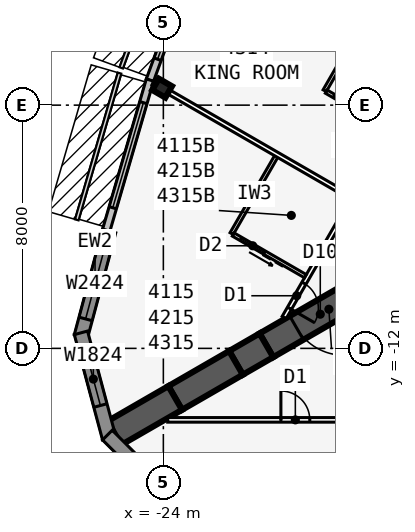
"""IFC4 building model, lengths in metres.
Left out: names, types, materials, properties, quantities, classifications, styles, units other than length and angle.
Written with IfcOpenShell. Run it as: python <this file> out.ifc"""

import sys

from ifc_helpers import new_model, si_unit, direction, frame, frame_2d, origin, origin_2d, place, context, subcontext, project, spatial, polyline, rectangle, i_section, outline, extrude, element, fill, save


model = new_model("IFC4")
c1 = context("Model", 3, precision=1e-05, world=origin(), true_north=direction((0.0, 1.0)))
c2 = subcontext(c1, "Body", "Model", "MODEL_VIEW")
j1 = project(units=[si_unit("LENGTHUNIT", "METRE"), si_unit("PLANEANGLEUNIT", "RADIAN")], contexts=[c1])
p1 = place(None, origin())
s1 = spatial("IfcSite", under=j1, at=p1, CompositionType="ELEMENT")
p2 = place(p1, origin())
s2 = spatial("IfcBuilding", under=s1, at=p2, CompositionType="ELEMENT")
p3 = place(p2, frame((0.0, 0.0, 155.5)))
s3 = spatial("IfcBuildingStorey", under=s2, at=p3, CompositionType="ELEMENT", Elevation=155.5)
p4 = place(p3, frame((-16.5, -9.526, 0.0), z_axis=(0.0, 0.0, 1.0), x_axis=(-0.866031398331, -0.499989616998, 0.0)))
e1 = element("IfcWall", 1, at=p4, inside=s3, PredefinedType="SHEAR", context=c2, shape_type="SweptSolid", body=[
    extrude(rectangle(XDim=4.746, YDim=0.9, at=frame_2d((2.373, 0.0))), origin(), (0.0, 0.0, 1.0), 3.4),
])
p5 = place(p4, frame((1.8, 0.0, 0.0)))
e2 = element("IfcOpeningElement", 2, at=p5, cuts=e1, PredefinedType="OPENING", context=c2, shape_type="SweptSolid", body=[
    extrude(rectangle(XDim=1.8, YDim=2.13, at=frame_2d((0.9, 1.065))), frame((0.0, 0.46, 0.0), z_axis=(0.0, -1.0, 0.0), x_axis=(1.0, 0.0, 0.0)), (0.0, 0.0, 1.0), 0.92),
])
p6 = place(p3, frame((-20.61, -11.899, 0.0), z_axis=(0.0, 0.0, 1.0), x_axis=(-0.866009537788, -0.500027479704, 0.0)))
e3 = element("IfcWall", 3, at=p6, inside=s3, PredefinedType="SHEAR", context=c2, shape_type="SweptSolid", body=[
    extrude(rectangle(XDim=1.155, YDim=0.9, at=frame_2d((0.577, 0.0))), origin(), (0.0, 0.0, 1.0), 3.4),
])
for number, where, z_axis, x_axis in (
    (4, (-21.61, -12.477, 0.0), (0.0, 0.0, 1.0), (-0.866, -0.5, 0.0)),
    (5, (-23.61, -13.631, 0.0), (0.0, 0.0, 1.0), (-0.866, -0.5, 0.0)),
):
    element("IfcWall", number, at=place(p3, frame(where, z_axis=z_axis, x_axis=x_axis)), inside=s3, PredefinedType="SHEAR", context=c2, shape_type="SweptSolid", body=[
        extrude(rectangle(XDim=2.309, YDim=0.9, at=frame_2d((1.155, 0.0))), origin(), (0.0, 0.0, 1.0), 3.4),
    ])
p7 = place(p3, frame((-24.041, -3.44, 0.0), z_axis=(0.0, 0.0, 1.0), x_axis=(-0.5, -0.866025403784, 0.0)))
e6 = element("IfcColumn", 6, at=p7, inside=s3, PredefinedType="COLUMN", context=c2, shape_type="SweptSolid", body=[
    extrude(i_section(OverallWidth=0.432, OverallDepth=0.498, WebThickness=0.056, FlangeThickness=0.089, at=origin_2d()), origin(), (0.0, 0.0, 1.0), 3.4),
])
p8 = place(p3, frame((-22.701, 1.584, 0.0), z_axis=(0.0, 0.0, 1.0), x_axis=(-0.343225593282, -0.939252996863, 0.0)))
e7 = element("IfcWall", 7, at=p8, inside=s3, PredefinedType="STANDARD", context=c2, shape_type="SweptSolid", body=[
    extrude(rectangle(XDim=5.076, YDim=0.25, at=frame_2d((2.538, 0.0))), origin(), (0.0, 0.0, 1.0), 3.235),
])
p9 = place(p8, frame((0.738, 0.0, 0.45)))
e8 = element("IfcOpeningElement", 8, at=p9, cuts=e7, PredefinedType="OPENING", context=c2, shape_type="SweptSolid", body=[
    extrude(rectangle(XDim=3.6, YDim=2.4, at=frame_2d((1.8, 1.2))), frame((0.0, 0.135, 0.0), z_axis=(0.0, -1.0, 0.0), x_axis=(1.0, 0.0, 0.0)), (0.0, 0.0, 1.0), 0.27),
])
p10 = place(p3, frame((-24.441, -3.175, 0.0), z_axis=(0.0, 0.0, 1.0), x_axis=(-0.279528287117, -0.960137457191, 0.0)))
e9 = element("IfcWall", 9, at=p10, inside=s3, PredefinedType="STANDARD", context=c2, shape_type="SweptSolid", body=[
    extrude(rectangle(XDim=5.148, YDim=0.25, at=frame_2d((2.574, 0.0))), origin(), (0.0, 0.0, 1.0), 3.235),
])
p11 = place(p10, frame((0.774, 0.0, 0.45)))
e10 = element("IfcOpeningElement", 10, at=p11, cuts=e9, PredefinedType="OPENING", context=c2, shape_type="SweptSolid", body=[
    extrude(rectangle(XDim=3.6, YDim=2.4, at=frame_2d((1.8, 1.2))), frame((0.0, 0.135, 0.0), z_axis=(0.0, -1.0, 0.0), x_axis=(1.0, 0.0, 0.0)), (0.0, 0.0, 1.0), 0.27),
])
p12 = place(p3, frame((-25.783, -8.141, 0.0), z_axis=(0.0, 0.0, 1.0), x_axis=(-0.258823421857, -0.965924653531, 0.0)))
e11 = element("IfcWall", 11, at=p12, inside=s3, PredefinedType="SOLIDWALL", context=c2, shape_type="SweptSolid", body=[
    extrude(rectangle(XDim=3.586, YDim=0.45, at=frame_2d((1.793, 0.0))), origin(), (0.0, 0.0, 1.0), 3.235),
])
p13 = place(p12, frame((0.593, 0.0, 0.45)))
e12 = element("IfcOpeningElement", 12, at=p13, cuts=e11, PredefinedType="OPENING", context=c2, shape_type="SweptSolid", body=[
    extrude(rectangle(XDim=2.4, YDim=2.4, at=frame_2d((1.2, 1.2))), frame((0.0, 0.235, 0.0), z_axis=(0.0, -1.0, 0.0), x_axis=(1.0, 0.0, 0.0)), (0.0, 0.0, 1.0), 0.47),
])
p14 = place(p3, frame((-26.711, -11.489, 0.0), z_axis=(0.0, 0.0, 1.0), x_axis=(0.258823421857, -0.965924653531, 0.0)))
e13 = element("IfcWall", 13, at=p14, inside=s3, PredefinedType="SOLIDWALL", context=c2, shape_type="SweptSolid", body=[
    extrude(outline(polyline([(3.586, 0.225), (3.527, 0.225), (3.035, 0.093), (3.0, 0.225), (0.0, 0.225), (0.0, -0.225), (3.586, -0.225), (3.586, 0.225)])), origin(), (0.0, 0.0, 1.0), 3.235),
])
p15 = place(p14, frame((0.675, 0.0, 0.45)))
e14 = element("IfcOpeningElement", 14, at=p15, cuts=e13, PredefinedType="OPENING", context=c2, shape_type="SweptSolid", body=[
    extrude(rectangle(XDim=1.8, YDim=2.4, at=frame_2d((0.9, 1.2))), frame((0.0, 0.235, 0.0), z_axis=(0.0, -1.0, 0.0), x_axis=(1.0, 0.0, 0.0)), (0.0, 0.0, 1.0), 0.47),
])
p16 = place(p3, frame((-25.841, -14.852, 0.0), z_axis=(0.0, 0.0, 1.0), x_axis=(0.707106781187, -0.707106781187, 0.0)))
e15 = element("IfcWall", 15, at=p16, inside=s3, PredefinedType="SOLIDWALL", context=c2, shape_type="SweptSolid", body=[
    extrude(outline(polyline([(3.586, 0.225), (0.586, 0.225), (0.551, 0.093), (0.059, 0.225), (0.0, 0.225), (0.0, -0.225), (3.586, -0.225), (3.586, 0.225)])), origin(), (0.0, 0.0, 1.0), 3.235),
])
p17 = place(p16, frame((1.111, 0.0, 0.45)))
e16 = element("IfcOpeningElement", 16, at=p17, cuts=e15, PredefinedType="OPENING", context=c2, shape_type="SweptSolid", body=[
    extrude(rectangle(XDim=1.8, YDim=2.4, at=frame_2d((0.9, 1.2))), frame((0.0, 0.235, 0.0), z_axis=(0.0, -1.0, 0.0), x_axis=(1.0, 0.0, 0.0)), (0.0, 0.0, 1.0), 0.47),
])
p18 = place(p3, frame((-23.857, -14.351, 0.0), z_axis=(0.0, 0.0, 1.0), x_axis=(1.0, 0.0, 0.0)))
e17 = element("IfcWall", 17, at=p18, inside=s3, PredefinedType="PARTITIONING", context=c2, shape_type="SweptSolid", body=[
    extrude(rectangle(XDim=47.714, YDim=0.15, at=frame_2d((23.857, 0.0))), origin(), (0.0, 0.0, 1.0), 3.235),
])
p19 = place(p18, frame((3.723, 0.0, 0.0)))
e18 = element("IfcOpeningElement", 18, at=p19, cuts=e17, PredefinedType="OPENING", context=c2, shape_type="SweptSolid", body=[
    extrude(rectangle(XDim=0.95, YDim=2.13, at=frame_2d((0.475, 1.065))), frame((0.0, 0.085, 0.0), z_axis=(0.0, -1.0, 0.0), x_axis=(1.0, 0.0, 0.0)), (0.0, 0.0, 1.0), 0.17),
])
p20 = place(p18, frame((17.082, 0.0, 0.0)))
e19 = element("IfcOpeningElement", 19, at=p20, cuts=e17, PredefinedType="OPENING", context=c2, shape_type="SweptSolid", body=[
    extrude(rectangle(XDim=0.95, YDim=2.13, at=frame_2d((0.475, 1.065))), frame((0.0, 0.085, 0.0), z_axis=(0.0, -1.0, 0.0), x_axis=(1.0, 0.0, 0.0)), (0.0, 0.0, 1.0), 0.17),
])
p21 = place(p18, frame((25.857, 0.0, 0.0)))
e20 = element("IfcOpeningElement", 20, at=p21, cuts=e17, PredefinedType="OPENING", context=c2, shape_type="SweptSolid", body=[
    extrude(rectangle(XDim=1.0, YDim=2.13, at=frame_2d((0.5, 1.065))), frame((0.0, 0.085, 0.0), z_axis=(0.0, -1.0, 0.0), x_axis=(1.0, 0.0, 0.0)), (0.0, 0.0, 1.0), 0.17),
])
p22 = place(p18, frame((30.282, 0.0, 0.0)))
e21 = element("IfcOpeningElement", 21, at=p22, cuts=e17, PredefinedType="OPENING", context=c2, shape_type="SweptSolid", body=[
    extrude(rectangle(XDim=0.95, YDim=2.13, at=frame_2d((0.475, 1.065))), frame((0.0, 0.085, 0.0), z_axis=(0.0, -1.0, 0.0), x_axis=(1.0, 0.0, 0.0)), (0.0, 0.0, 1.0), 0.17),
])
p23 = place(p18, frame((43.041, 0.0, 0.0)))
e22 = element("IfcOpeningElement", 22, at=p23, cuts=e17, PredefinedType="OPENING", context=c2, shape_type="SweptSolid", body=[
    extrude(rectangle(XDim=0.95, YDim=2.13, at=frame_2d((0.475, 1.065))), frame((0.0, 0.085, 0.0), z_axis=(0.0, -1.0, 0.0), x_axis=(1.0, 0.0, 0.0)), (0.0, 0.0, 1.0), 0.17),
])
p24 = place(p3, frame((-0.5, 22.836, 0.0), z_axis=(0.0, 0.0, 1.0), x_axis=(-0.500001677587, -0.866024435227, 0.0)))
e23 = element("IfcWall", 23, at=p24, inside=s3, PredefinedType="PARTITIONING", context=c2, shape_type="SweptSolid", body=[
    extrude(rectangle(XDim=39.054, YDim=0.15, at=frame_2d((19.527, 0.0))), origin(), (0.0, 0.0, 1.0), 3.235),
])
p25 = place(p24, frame((0.352, 0.0, 0.0)))
e24 = element("IfcOpeningElement", 24, at=p25, cuts=e23, PredefinedType="OPENING", context=c2, shape_type="SweptSolid", body=[
    extrude(rectangle(XDim=0.95, YDim=2.13, at=frame_2d((0.475, 1.065))), frame((0.0, 0.085, 0.0), z_axis=(0.0, -1.0, 0.0), x_axis=(1.0, 0.0, 0.0)), (0.0, 0.0, 1.0), 0.17),
])
p26 = place(p24, frame((5.952, 0.0, 0.0)))
e25 = element("IfcOpeningElement", 25, at=p26, cuts=e23, PredefinedType="OPENING", context=c2, shape_type="SweptSolid", body=[
    extrude(rectangle(XDim=0.95, YDim=2.13, at=frame_2d((0.475, 1.065))), frame((0.0, 0.085, 0.0), z_axis=(0.0, -1.0, 0.0), x_axis=(1.0, 0.0, 0.0)), (0.0, 0.0, 1.0), 0.17),
])
p27 = place(p24, frame((12.752, 0.0, 0.0)))
e26 = element("IfcOpeningElement", 26, at=p27, cuts=e23, PredefinedType="OPENING", context=c2, shape_type="SweptSolid", body=[
    extrude(rectangle(XDim=0.95, YDim=2.13, at=frame_2d((0.475, 1.065))), frame((0.0, 0.085, 0.0), z_axis=(0.0, -1.0, 0.0), x_axis=(1.0, 0.0, 0.0)), (0.0, 0.0, 1.0), 0.17),
])
p28 = place(p24, frame((25.352, 0.0, 0.0)))
e27 = element("IfcOpeningElement", 27, at=p28, cuts=e23, PredefinedType="OPENING", context=c2, shape_type="SweptSolid", body=[
    extrude(rectangle(XDim=0.95, YDim=2.13, at=frame_2d((0.475, 1.065))), frame((0.0, 0.085, 0.0), z_axis=(0.0, -1.0, 0.0), x_axis=(1.0, 0.0, 0.0)), (0.0, 0.0, 1.0), 0.17),
])
p29 = place(p24, frame((32.152, 0.0, 0.0)))
e28 = element("IfcOpeningElement", 28, at=p29, cuts=e23, PredefinedType="OPENING", context=c2, shape_type="SweptSolid", body=[
    extrude(rectangle(XDim=0.95, YDim=2.13, at=frame_2d((0.475, 1.065))), frame((0.0, 0.085, 0.0), z_axis=(0.0, -1.0, 0.0), x_axis=(1.0, 0.0, 0.0)), (0.0, 0.0, 1.0), 0.17),
])
p30 = place(p24, frame((37.752, 0.0, 0.0)))
e29 = element("IfcOpeningElement", 29, at=p30, cuts=e23, PredefinedType="OPENING", context=c2, shape_type="SweptSolid", body=[
    extrude(rectangle(XDim=0.95, YDim=2.13, at=frame_2d((0.475, 1.065))), frame((0.0, 0.085, 0.0), z_axis=(0.0, -1.0, 0.0), x_axis=(1.0, 0.0, 0.0)), (0.0, 0.0, 1.0), 0.17),
])
p31 = place(p3, frame((-15.329, -2.697, 0.0), z_axis=(0.0, 0.0, 1.0), x_axis=(-0.866024316602, 0.50000188305, 0.0)))
e30 = element("IfcWall", 30, at=p31, inside=s3, PredefinedType="PARTITIONING", context=c2, shape_type="SweptSolid", body=[
    extrude(rectangle(XDim=8.395, YDim=0.15, at=frame_2d((4.198, 0.0))), origin(), (0.0, 0.0, 1.0), 2.389),
])
p32 = place(p3, frame((-17.829, -7.027, 0.0), z_axis=(0.0, 0.0, 1.0), x_axis=(-0.866029804378, 0.499992377871, 0.0)))
e31 = element("IfcWall", 31, at=p32, inside=s3, PredefinedType="PARTITIONING", context=c2, shape_type="SweptSolid", body=[
    extrude(rectangle(XDim=7.516, YDim=0.15, at=frame_2d((3.758, 0.0))), origin(), (0.0, 0.0, 1.0), 2.389),
])
p33 = place(p3, frame((-17.493, -1.447, 0.0), z_axis=(0.0, 0.0, 1.0), x_axis=(-0.500033551112, -0.866006032174, 0.0)))
e32 = element("IfcWall", 32, at=p33, inside=s3, PredefinedType="PLUMBINGWALL", context=c2, shape_type="SweptSolid", body=[
    extrude(rectangle(XDim=2.4, YDim=0.12, at=frame_2d((1.2, 0.0))), origin(), (0.0, 0.0, 1.0), 3.235),
])
p34 = place(p3, frame((-16.529, -4.776, 0.0), z_axis=(0.0, 0.0, 1.0), x_axis=(-0.866023955769, 0.500002508028, 0.0)))
e33 = element("IfcWall", 33, at=p34, inside=s3, PredefinedType="PLUMBINGWALL", context=c2, shape_type="SweptSolid", body=[
    extrude(rectangle(XDim=2.44, YDim=0.12, at=frame_2d((1.22, 0.0))), origin(), (0.0, 0.0, 1.0), 3.235),
])
p35 = place(p34, frame((1.25, 0.0, 0.0)))
e34 = element("IfcOpeningElement", 34, at=p35, cuts=e33, PredefinedType="OPENING", context=c2, shape_type="SweptSolid", body=[
    extrude(rectangle(XDim=0.9, YDim=2.13, at=frame_2d((0.45, 1.065))), frame((0.0, 0.07, 0.0), z_axis=(0.0, -1.0, 0.0), x_axis=(1.0, 0.0, 0.0)), (0.0, 0.0, 1.0), 0.14),
])
p36 = place(p3, frame((-20.253, -5.627, 0.0), z_axis=(0.0, 0.0, 1.0), x_axis=(-0.499990139034, -0.866031096941, 0.0)))
e35 = element("IfcWall", 35, at=p36, inside=s3, PredefinedType="PLUMBINGWALL", context=c2, shape_type="SweptSolid", body=[
    extrude(rectangle(XDim=3.0, YDim=0.12, at=frame_2d((1.5, 0.0))), origin(), (0.0, 0.0, 1.0), 3.235),
])
p37 = place(p3, frame((-19.329, -9.625, 0.0), z_axis=(0.0, 0.0, 1.0), x_axis=(-0.866035715982, 0.499982138324, 0.0)))
e36 = element("IfcWall", 36, at=p37, inside=s3, PredefinedType="PLUMBINGWALL", context=c2, shape_type="SweptSolid", body=[
    extrude(rectangle(XDim=2.74, YDim=0.12, at=frame_2d((1.37, 0.0))), origin(), (0.0, 0.0, 1.0), 3.235),
])
p38 = place(p37, frame((1.55, 0.0, 0.0)))
e37 = element("IfcOpeningElement", 37, at=p38, cuts=e36, PredefinedType="OPENING", context=c2, shape_type="SweptSolid", body=[
    extrude(rectangle(XDim=0.9, YDim=2.13, at=frame_2d((0.45, 1.065))), frame((0.0, 0.07, 0.0), z_axis=(0.0, -1.0, 0.0), x_axis=(1.0, 0.0, 0.0)), (0.0, 0.0, 1.0), 0.14),
])
p39 = place(p9, origin())
e38 = element("IfcWindow", 38, at=p39, inside=s3, PartitioningType="SINGLE_PANEL", PredefinedType="WINDOW", context=c2, shape_type="SweptSolid", body=[
    extrude(rectangle(XDim=3.6, YDim=2.4, at=frame_2d((1.8, 1.2))), frame((0.0, 0.03, 0.0), z_axis=(0.0, -1.0, 0.0), x_axis=(1.0, 0.0, 0.0)), (0.0, 0.0, 1.0), 0.06),
])
fill(e8, e38)
p40 = place(p11, origin())
e39 = element("IfcWindow", 39, at=p40, inside=s3, PartitioningType="SINGLE_PANEL", PredefinedType="WINDOW", context=c2, shape_type="SweptSolid", body=[
    extrude(rectangle(XDim=3.6, YDim=2.4, at=frame_2d((1.8, 1.2))), frame((0.0, 0.03, 0.0), z_axis=(0.0, -1.0, 0.0), x_axis=(1.0, 0.0, 0.0)), (0.0, 0.0, 1.0), 0.06),
])
fill(e10, e39)
p41 = place(p13, origin())
e40 = element("IfcWindow", 40, at=p41, inside=s3, PartitioningType="SINGLE_PANEL", PredefinedType="WINDOW", context=c2, shape_type="SweptSolid", body=[
    extrude(rectangle(XDim=2.4, YDim=2.4, at=frame_2d((1.2, 1.2))), frame((0.0, 0.03, 0.0), z_axis=(0.0, -1.0, 0.0), x_axis=(1.0, 0.0, 0.0)), (0.0, 0.0, 1.0), 0.06),
])
fill(e12, e40)
p42 = place(p15, origin())
e41 = element("IfcWindow", 41, at=p42, inside=s3, PartitioningType="SINGLE_PANEL", PredefinedType="WINDOW", context=c2, shape_type="SweptSolid", body=[
    extrude(rectangle(XDim=1.8, YDim=2.4, at=frame_2d((0.9, 1.2))), frame((0.0, 0.03, 0.0), z_axis=(0.0, -1.0, 0.0), x_axis=(1.0, 0.0, 0.0)), (0.0, 0.0, 1.0), 0.06),
])
fill(e14, e41)
p43 = place(p19, origin())
e42 = element("IfcDoor", 42, at=p43, inside=s3, OperationType="SINGLE_SWING_LEFT", PredefinedType="DOOR", context=c2, shape_type="SweptSolid", body=[
    extrude(rectangle(XDim=0.95, YDim=2.13, at=frame_2d((0.475, 1.065))), frame((0.0, 0.025, 0.0), z_axis=(0.0, -1.0, 0.0), x_axis=(1.0, 0.0, 0.0)), (0.0, 0.0, 1.0), 0.05),
])
fill(e18, e42)
p44 = place(p35, origin())
e43 = element("IfcDoor", 43, at=p44, inside=s3, OperationType="SLIDING_TO_LEFT", PredefinedType="DOOR", context=c2, shape_type="SweptSolid", body=[
    extrude(rectangle(XDim=0.9, YDim=2.13, at=frame_2d((0.45, 1.065))), frame((0.0, 0.025, 0.0), z_axis=(0.0, -1.0, 0.0), x_axis=(1.0, 0.0, 0.0)), (0.0, 0.0, 1.0), 0.05),
])
fill(e34, e43)
p45 = place(p38, origin())
e44 = element("IfcDoor", 44, at=p45, inside=s3, OperationType="SLIDING_TO_LEFT", PredefinedType="DOOR", context=c2, shape_type="SweptSolid", body=[
    extrude(rectangle(XDim=0.9, YDim=2.13, at=frame_2d((0.45, 1.065))), frame((0.0, 0.025, 0.0), z_axis=(0.0, -1.0, 0.0), x_axis=(1.0, 0.0, 0.0)), (0.0, 0.0, 1.0), 0.05),
])
fill(e37, e44)
p46 = place(p30, origin())
e45 = element("IfcDoor", 45, at=p46, inside=s3, OperationType="SINGLE_SWING_RIGHT", PredefinedType="DOOR", context=c2, shape_type="SweptSolid", body=[
    extrude(rectangle(XDim=0.95, YDim=2.13, at=frame_2d((0.475, 1.065))), frame((0.0, 0.025, 0.0), z_axis=(0.0, -1.0, 0.0), x_axis=(1.0, 0.0, 0.0)), (0.0, 0.0, 1.0), 0.05),
])
fill(e29, e45)
p47 = place(p5, origin())
e46 = element("IfcDoor", 46, at=p47, inside=s3, OperationType="DOUBLE_DOOR_DOUBLE_SWING", PredefinedType="DOOR", context=c2, shape_type="SweptSolid", body=[
    extrude(rectangle(XDim=1.8, YDim=2.13, at=frame_2d((0.9, 1.065))), frame((0.0, 0.025, 0.0), z_axis=(0.0, -1.0, 0.0), x_axis=(1.0, 0.0, 0.0)), (0.0, 0.0, 1.0), 0.05),
])
fill(e2, e46)
save(model, sys.argv[1])
